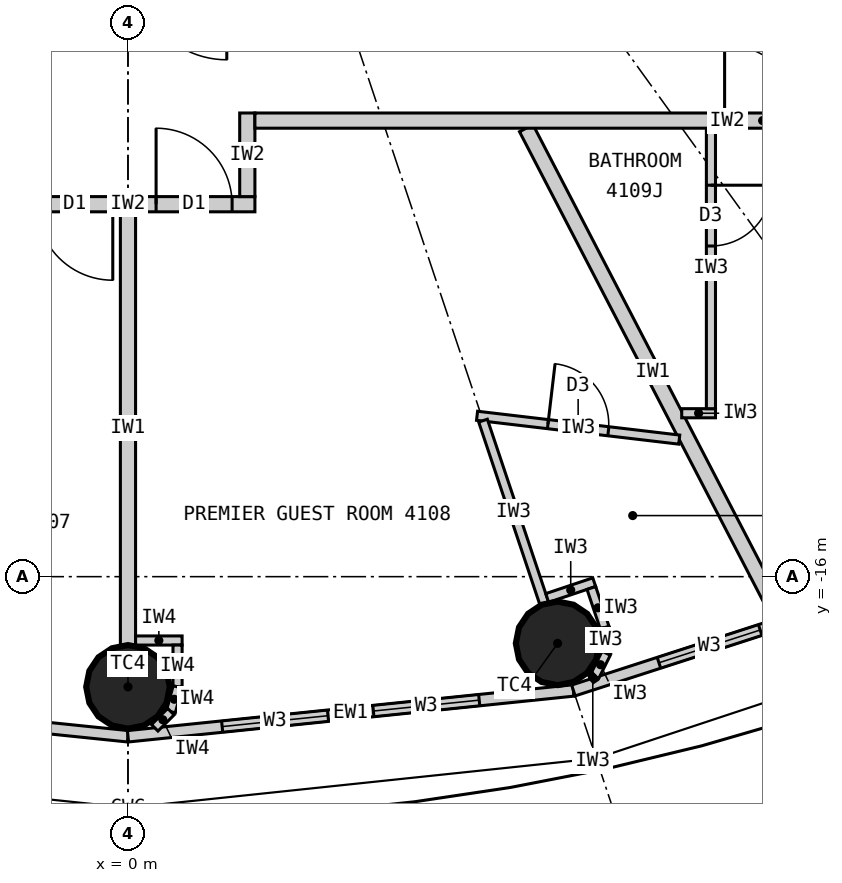
"""IFC4 building model, lengths in metres.
Left out: names, types, materials, properties, quantities, classifications, styles, units other than length and angle.
Written with IfcOpenShell. Run it as: python <this file> out.ifc"""

import sys

from ifc_helpers import new_model, si_unit, direction, frame, frame_2d, origin, origin_2d, place, context, subcontext, project, spatial, rectangle, circle, extrude, element, fill, save


model = new_model("IFC4")
c1 = context("Model", 3, precision=1e-05, world=origin(), true_north=direction((0.0, 1.0)))
c2 = subcontext(c1, "Body", "Model", "MODEL_VIEW")
j1 = project(units=[si_unit("LENGTHUNIT", "METRE"), si_unit("PLANEANGLEUNIT", "RADIAN")], contexts=[c1])
p1 = place(None, origin())
s1 = spatial("IfcSite", under=j1, at=p1, CompositionType="ELEMENT")
p2 = place(p1, origin())
s2 = spatial("IfcBuilding", under=s1, at=p2, CompositionType="ELEMENT")
p3 = place(p2, frame((0.0, 0.0, 156.6)))
s3 = spatial("IfcBuildingStorey", under=s2, at=p3, CompositionType="ELEMENT", Elevation=156.6)
for number, where, z_axis, x_axis in (
    (1, (0.0, -17.45, 0.0), (0.0, 0.0, 1.0), (1.0, 0.0, 0.0)),
    (2, (5.653, -16.877, 0.0), (0.0, 0.0, 1.0), (1.0, 0.0, 0.0)),
):
    element("IfcColumn", number, at=place(p3, frame(where, z_axis=z_axis, x_axis=x_axis)), inside=s3, PredefinedType="COLUMN", context=c2, shape_type="SweptSolid", body=[
        extrude(circle(Radius=0.55, at=origin_2d()), origin(), (0.0, 0.0, 1.0), 3.3),
    ])
p4 = place(p3, frame((-5.86, -17.497, 0.0), z_axis=(0.0, 0.0, 1.0), x_axis=(0.994751738032, -0.102318032045, 0.0)))
e3 = element("IfcWall", 3, at=p4, inside=s3, PredefinedType="ELEMENTEDWALL", context=c2, shape_type="SweptSolid", body=[
    extrude(rectangle(XDim=5.891, YDim=0.15, at=frame_2d((2.946, 0.0))), origin(), (0.0, 0.0, 1.0), 3.12),
])
p5 = place(p4, frame((1.246, 0.0, 0.9)))
e4 = element("IfcOpeningElement", 4, at=p5, cuts=e3, PredefinedType="OPENING", context=c2, shape_type="SweptSolid", body=[
    extrude(rectangle(XDim=1.4, YDim=1.9, at=frame_2d((0.7, 0.95))), frame((0.0, 0.085, 0.0), z_axis=(0.0, -1.0, 0.0), x_axis=(1.0, 0.0, 0.0)), (0.0, 0.0, 1.0), 0.17),
])
p6 = place(p4, frame((3.246, 0.0, 0.9)))
e5 = element("IfcOpeningElement", 5, at=p6, cuts=e3, PredefinedType="OPENING", context=c2, shape_type="SweptSolid", body=[
    extrude(rectangle(XDim=1.4, YDim=1.9, at=frame_2d((0.7, 0.95))), frame((0.0, 0.085, 0.0), z_axis=(0.0, -1.0, 0.0), x_axis=(1.0, 0.0, 0.0)), (0.0, 0.0, 1.0), 0.17),
])
p7 = place(p3, frame((0.0, -18.1, 0.0), z_axis=(0.0, 0.0, 1.0), x_axis=(0.994751738032, 0.102318032045, 0.0)))
e6 = element("IfcWall", 6, at=p7, inside=s3, PredefinedType="ELEMENTEDWALL", context=c2, shape_type="SweptSolid", body=[
    extrude(rectangle(XDim=5.891, YDim=0.15, at=frame_2d((2.946, 0.0))), origin(), (0.0, 0.0, 1.0), 3.12),
])
p8 = place(p7, frame((1.246, 0.0, 0.9)))
e7 = element("IfcOpeningElement", 7, at=p8, cuts=e6, PredefinedType="OPENING", context=c2, shape_type="SweptSolid", body=[
    extrude(rectangle(XDim=1.4, YDim=1.9, at=frame_2d((0.7, 0.95))), frame((0.0, 0.085, 0.0), z_axis=(0.0, -1.0, 0.0), x_axis=(1.0, 0.0, 0.0)), (0.0, 0.0, 1.0), 0.17),
])
p9 = place(p7, frame((3.246, 0.0, 0.9)))
e8 = element("IfcOpeningElement", 8, at=p9, cuts=e6, PredefinedType="OPENING", context=c2, shape_type="SweptSolid", body=[
    extrude(rectangle(XDim=1.4, YDim=1.9, at=frame_2d((0.7, 0.95))), frame((0.0, 0.085, 0.0), z_axis=(0.0, -1.0, 0.0), x_axis=(1.0, 0.0, 0.0)), (0.0, 0.0, 1.0), 0.17),
])
p10 = place(p3, frame((5.86, -17.497, 0.0), z_axis=(0.0, 0.0, 1.0), x_axis=(0.951432482129, 0.307857486429, 0.0)))
e9 = element("IfcWall", 9, at=p10, inside=s3, PredefinedType="ELEMENTEDWALL", context=c2, shape_type="SweptSolid", body=[
    extrude(rectangle(XDim=5.766, YDim=0.15, at=frame_2d((2.883, 0.0))), origin(), (0.0, 0.0, 1.0), 3.12),
])
p11 = place(p10, frame((1.183, 0.0, 0.9)))
e10 = element("IfcOpeningElement", 10, at=p11, cuts=e9, PredefinedType="OPENING", context=c2, shape_type="SweptSolid", body=[
    extrude(rectangle(XDim=1.4, YDim=1.9, at=frame_2d((0.7, 0.95))), frame((0.0, 0.085, 0.0), z_axis=(0.0, -1.0, 0.0), x_axis=(1.0, 0.0, 0.0)), (0.0, 0.0, 1.0), 0.17),
])
p12 = place(p10, frame((3.183, 0.0, 0.9)))
e11 = element("IfcOpeningElement", 11, at=p12, cuts=e9, PredefinedType="OPENING", context=c2, shape_type="SweptSolid", body=[
    extrude(rectangle(XDim=1.4, YDim=1.9, at=frame_2d((0.7, 0.95))), frame((0.0, 0.085, 0.0), z_axis=(0.0, -1.0, 0.0), x_axis=(1.0, 0.0, 0.0)), (0.0, 0.0, 1.0), 0.17),
])
p13 = place(p3, frame((0.0, -11.2, 0.0), z_axis=(0.0, 0.0, 1.0), x_axis=(0.0, -1.0, 0.0)))
e12 = element("IfcWall", 12, at=p13, inside=s3, PredefinedType="PARTITIONING", context=c2, shape_type="SweptSolid", body=[
    extrude(rectangle(XDim=5.7, YDim=0.2, at=frame_2d((2.85, 0.0))), origin(), (0.0, 0.0, 1.0), 2.42),
])
p14 = place(p3, frame((5.24, -10.1, 0.0), z_axis=(0.0, 0.0, 1.0), x_axis=(0.460532965373, -0.887642601391, 0.0)))
e13 = element("IfcWall", 13, at=p14, inside=s3, PredefinedType="PARTITIONING", context=c2, shape_type="SweptSolid", body=[
    extrude(rectangle(XDim=7.231, YDim=0.2, at=frame_2d((3.616, 0.0))), origin(), (0.0, 0.0, 1.0), 3.12),
])
p15 = place(p3, frame((1.67, -11.1, 0.0), z_axis=(0.0, 0.0, 1.0), x_axis=(-1.0, 0.0, 0.0)))
e14 = element("IfcWall", 14, at=p15, inside=s3, PredefinedType="PARTITIONING", context=c2, shape_type="SweptSolid", body=[
    extrude(rectangle(XDim=3.34, YDim=0.2, at=frame_2d((1.67, 0.0))), origin(), (0.0, 0.0, 1.0), 3.12),
])
p16 = place(p15, frame((1.87, 0.0, 0.0)))
e15 = element("IfcOpeningElement", 15, at=p16, cuts=e14, PredefinedType="OPENING", context=c2, shape_type="SweptSolid", body=[
    extrude(rectangle(XDim=1.0, YDim=2.2, at=frame_2d((0.5, 1.1))), frame((0.0, 0.11, 0.0), z_axis=(0.0, -1.0, 0.0), x_axis=(1.0, 0.0, 0.0)), (0.0, 0.0, 1.0), 0.22),
])
p17 = place(p15, frame((0.3, 0.0, 0.0)))
e16 = element("IfcOpeningElement", 16, at=p17, cuts=e14, PredefinedType="OPENING", context=c2, shape_type="SweptSolid", body=[
    extrude(rectangle(XDim=1.0, YDim=2.2, at=frame_2d((0.5, 1.1))), frame((0.0, 0.11, 0.0), z_axis=(0.0, -1.0, 0.0), x_axis=(1.0, 0.0, 0.0)), (0.0, 0.0, 1.0), 0.22),
])
p18 = place(p3, frame((1.57, -9.9, 0.0), z_axis=(0.0, 0.0, 1.0), x_axis=(0.0, -1.0, 0.0)))
e17 = element("IfcWall", 17, at=p18, inside=s3, PredefinedType="PARTITIONING", context=c2, shape_type="SweptSolid", body=[
    extrude(rectangle(XDim=1.1, YDim=0.2, at=frame_2d((0.55, 0.0))), origin(), (0.0, 0.0, 1.0), 3.12),
])
p19 = place(p3, frame((7.253, -14.197, 0.0), z_axis=(0.0, 0.0, 1.0), x_axis=(-0.993128188393, 0.117031625725, 0.0)))
e18 = element("IfcWall", 18, at=p19, inside=s3, PredefinedType="PARTITIONING", context=c2, shape_type="SweptSolid", body=[
    extrude(rectangle(XDim=2.678, YDim=0.12, at=frame_2d((1.339, 0.0))), origin(), (0.0, 0.0, 1.0), 3.12),
])
p20 = place(p19, frame((0.939, 0.0, 0.0)))
e19 = element("IfcOpeningElement", 19, at=p20, cuts=e18, PredefinedType="OPENING", context=c2, shape_type="SweptSolid", body=[
    extrude(rectangle(XDim=0.8, YDim=2.1, at=frame_2d((0.4, 1.05))), frame((0.0, 0.07, 0.0), z_axis=(0.0, -1.0, 0.0), x_axis=(1.0, 0.0, 0.0)), (0.0, 0.0, 1.0), 0.14),
])
p21 = place(p3, frame((4.671, -13.948, 0.0), z_axis=(0.0, 0.0, 1.0), x_axis=(0.317669167093, -0.948201613729, 0.0)))
e20 = element("IfcWall", 20, at=p21, inside=s3, PredefinedType="PARTITIONING", context=c2, shape_type="SweptSolid", body=[
    extrude(rectangle(XDim=2.54, YDim=0.12, at=frame_2d((1.27, 0.0))), origin(), (0.0, 0.0, 1.0), 2.42),
])
p22 = place(p3, frame((5.516, -16.28, 0.0), z_axis=(0.0, 0.0, 1.0), x_axis=(0.948157944392, 0.317799484717, 0.0)))
e21 = element("IfcWall", 21, at=p22, inside=s3, PredefinedType="PARTITIONING", context=c2, shape_type="SweptSolid", body=[
    extrude(rectangle(XDim=0.652, YDim=0.12, at=frame_2d((0.326, 0.0))), origin(), (0.0, 0.0, 1.0), 3.12),
])
p23 = place(p3, frame((6.097, -16.149, 0.0), z_axis=(0.0, 0.0, 1.0), x_axis=(0.317292604854, -0.948327687514, 0.0)))
e22 = element("IfcWall", 22, at=p23, inside=s3, PredefinedType="PARTITIONING", context=c2, shape_type="SweptSolid", body=[
    extrude(rectangle(XDim=0.55, YDim=0.12, at=frame_2d((0.275, 0.0))), origin(), (0.0, 0.0, 1.0), 3.12),
])
for number, where, z_axis, x_axis in (
    (23, (6.271, -16.67, 0.0), (0.0, 0.0, 1.0), (0.061, -0.998, 0.0)),
    (24, (6.292, -17.007, 0.0), (0.0, 0.0, 1.0), (-0.445, -0.895, 0.0)),
):
    element("IfcWall", number, at=place(p3, frame(where, z_axis=z_axis, x_axis=x_axis)), inside=s3, PredefinedType="PARTITIONING", context=c2, shape_type="SweptSolid", body=[
        extrude(rectangle(XDim=0.338, YDim=0.12, at=frame_2d((0.169, 0.0))), origin(), (0.0, 0.0, 1.0), 3.12),
    ])
p24 = place(p3, frame((6.142, -17.31, 0.0), z_axis=(0.0, 0.0, 1.0), x_axis=(-0.835039693181, -0.550189704386, 0.0)))
e25 = element("IfcWall", 25, at=p24, inside=s3, PredefinedType="PARTITIONING", context=c2, shape_type="SweptSolid", body=[
    extrude(rectangle(XDim=0.062, YDim=0.12, at=frame_2d((0.031, 0.0))), origin(), (0.0, 0.0, 1.0), 3.12),
])
p25 = place(p3, frame((7.286, -13.85, 0.0), z_axis=(0.0, 0.0, 1.0), x_axis=(1.0, 0.0, 0.0)))
e26 = element("IfcWall", 26, at=p25, inside=s3, PredefinedType="PARTITIONING", context=c2, shape_type="SweptSolid", body=[
    extrude(rectangle(XDim=0.444, YDim=0.12, at=frame_2d((0.222, 0.0))), origin(), (0.0, 0.0, 1.0), 3.12),
])
p26 = place(p3, frame((7.67, -10.1, 0.0), z_axis=(0.0, 0.0, 1.0), x_axis=(0.0, -1.0, 0.0)))
e27 = element("IfcWall", 27, at=p26, inside=s3, PredefinedType="PARTITIONING", context=c2, shape_type="SweptSolid", body=[
    extrude(rectangle(XDim=3.69, YDim=0.12, at=frame_2d((1.845, 0.0))), origin(), (0.0, 0.0, 1.0), 3.12),
])
p27 = place(p26, frame((0.75, 0.0, 0.0)))
e28 = element("IfcOpeningElement", 28, at=p27, cuts=e27, PredefinedType="OPENING", context=c2, shape_type="SweptSolid", body=[
    extrude(rectangle(XDim=0.8, YDim=2.1, at=frame_2d((0.4, 1.05))), frame((0.0, 0.07, 0.0), z_axis=(0.0, -1.0, 0.0), x_axis=(1.0, 0.0, 0.0)), (0.0, 0.0, 1.0), 0.14),
])
p28 = place(p3, frame((14.1, -10.0, 0.0), z_axis=(0.0, 0.0, 1.0), x_axis=(-1.0, 0.0, 0.0)))
e29 = element("IfcWall", 29, at=p28, inside=s3, PredefinedType="PARTITIONING", context=c2, shape_type="SweptSolid", body=[
    extrude(rectangle(XDim=12.43, YDim=0.2, at=frame_2d((6.215, 0.0))), origin(), (0.0, 0.0, 1.0), 3.12),
])
p29 = place(p28, frame((5.25, 0.0, 0.0)))
e30 = element("IfcOpeningElement", 30, at=p29, cuts=e29, PredefinedType="OPENING", context=c2, shape_type="SweptSolid", body=[
    extrude(rectangle(XDim=1.0, YDim=2.2, at=frame_2d((0.5, 1.1))), frame((0.0, 0.11, 0.0), z_axis=(0.0, -1.0, 0.0), x_axis=(1.0, 0.0, 0.0)), (0.0, 0.0, 1.0), 0.22),
])
p30 = place(p3, frame((0.1, -16.84, 0.0), z_axis=(0.0, 0.0, 1.0), x_axis=(1.0, 0.0, 0.0)))
e31 = element("IfcWall", 31, at=p30, inside=s3, PredefinedType="PARTITIONING", context=c2, shape_type="SweptSolid", body=[
    extrude(rectangle(XDim=0.612, YDim=0.12, at=frame_2d((0.306, 0.0))), origin(), (0.0, 0.0, 1.0), 3.12),
])
p31 = place(p3, frame((0.652, -16.9, 0.0), z_axis=(0.0, 0.0, 1.0), x_axis=(0.0, -1.0, 0.0)))
e32 = element("IfcWall", 32, at=p31, inside=s3, PredefinedType="PARTITIONING", context=c2, shape_type="SweptSolid", body=[
    extrude(rectangle(XDim=0.55, YDim=0.12, at=frame_2d((0.275, 0.0))), origin(), (0.0, 0.0, 1.0), 3.12),
])
p32 = place(p3, frame((0.652, -17.45, 0.0), z_axis=(0.0, 0.0, 1.0), x_axis=(-0.258832454679, -0.965922233104, 0.0)))
e33 = element("IfcWall", 33, at=p32, inside=s3, PredefinedType="PARTITIONING", context=c2, shape_type="SweptSolid", body=[
    extrude(rectangle(XDim=0.338, YDim=0.12, at=frame_2d((0.169, 0.0))), origin(), (0.0, 0.0, 1.0), 3.12),
])
p33 = place(p3, frame((0.565, -17.776, 0.0), z_axis=(0.0, 0.0, 1.0), x_axis=(-0.707106781187, -0.707106781187, 0.0)))
e34 = element("IfcWall", 34, at=p33, inside=s3, PredefinedType="PARTITIONING", context=c2, shape_type="SweptSolid", body=[
    extrude(rectangle(XDim=0.301, YDim=0.12, at=frame_2d((0.15, 0.0))), origin(), (0.0, 0.0, 1.0), 3.12),
])
p34 = place(p8, origin())
e35 = element("IfcWindow", 35, at=p34, inside=s3, PartitioningType="SINGLE_PANEL", PredefinedType="WINDOW", context=c2, shape_type="SweptSolid", body=[
    extrude(rectangle(XDim=1.4, YDim=1.9, at=frame_2d((0.7, 0.95))), frame((0.0, 0.03, 0.0), z_axis=(0.0, -1.0, 0.0), x_axis=(1.0, 0.0, 0.0)), (0.0, 0.0, 1.0), 0.06),
])
fill(e7, e35)
p35 = place(p9, origin())
e36 = element("IfcWindow", 36, at=p35, inside=s3, PartitioningType="SINGLE_PANEL", PredefinedType="WINDOW", context=c2, shape_type="SweptSolid", body=[
    extrude(rectangle(XDim=1.4, YDim=1.9, at=frame_2d((0.7, 0.95))), frame((0.0, 0.03, 0.0), z_axis=(0.0, -1.0, 0.0), x_axis=(1.0, 0.0, 0.0)), (0.0, 0.0, 1.0), 0.06),
])
fill(e8, e36)
p36 = place(p11, origin())
e37 = element("IfcWindow", 37, at=p36, inside=s3, PartitioningType="SINGLE_PANEL", PredefinedType="WINDOW", context=c2, shape_type="SweptSolid", body=[
    extrude(rectangle(XDim=1.4, YDim=1.9, at=frame_2d((0.7, 0.95))), frame((0.0, 0.03, 0.0), z_axis=(0.0, -1.0, 0.0), x_axis=(1.0, 0.0, 0.0)), (0.0, 0.0, 1.0), 0.06),
])
fill(e10, e37)
p37 = place(p16, origin())
e38 = element("IfcDoor", 38, at=p37, inside=s3, OperationType="SINGLE_SWING_LEFT", PredefinedType="DOOR", context=c2, shape_type="SweptSolid", body=[
    extrude(rectangle(XDim=1.0, YDim=2.2, at=frame_2d((0.5, 1.1))), frame((0.0, 0.025, 0.0), z_axis=(0.0, -1.0, 0.0), x_axis=(1.0, 0.0, 0.0)), (0.0, 0.0, 1.0), 0.05),
])
fill(e15, e38)
p38 = place(p20, origin())
e39 = element("IfcDoor", 39, at=p38, inside=s3, OperationType="SINGLE_SWING_RIGHT", PredefinedType="DOOR", context=c2, shape_type="SweptSolid", body=[
    extrude(rectangle(XDim=0.8, YDim=2.1, at=frame_2d((0.4, 1.05))), frame((0.0, 0.025, 0.0), z_axis=(0.0, -1.0, 0.0), x_axis=(1.0, 0.0, 0.0)), (0.0, 0.0, 1.0), 0.05),
])
fill(e19, e39)
p39 = place(p17, origin())
e40 = element("IfcDoor", 40, at=p39, inside=s3, OperationType="SINGLE_SWING_RIGHT", PredefinedType="DOOR", context=c2, shape_type="SweptSolid", body=[
    extrude(rectangle(XDim=1.0, YDim=2.2, at=frame_2d((0.5, 1.1))), frame((0.0, 0.025, 0.0), z_axis=(0.0, -1.0, 0.0), x_axis=(1.0, 0.0, 0.0)), (0.0, 0.0, 1.0), 0.05),
])
fill(e16, e40)
p40 = place(p27, origin())
e41 = element("IfcDoor", 41, at=p40, inside=s3, OperationType="SINGLE_SWING_LEFT", PredefinedType="DOOR", context=c2, shape_type="SweptSolid", body=[
    extrude(rectangle(XDim=0.8, YDim=2.1, at=frame_2d((0.4, 1.05))), frame((0.0, 0.025, 0.0), z_axis=(0.0, -1.0, 0.0), x_axis=(1.0, 0.0, 0.0)), (0.0, 0.0, 1.0), 0.05),
])
fill(e28, e41)
p41 = place(p29, origin())
e42 = element("IfcDoor", 42, at=p41, inside=s3, OperationType="SINGLE_SWING_RIGHT", PredefinedType="DOOR", context=c2, shape_type="SweptSolid", body=[
    extrude(rectangle(XDim=1.0, YDim=2.2, at=frame_2d((0.5, 1.1))), frame((0.0, 0.025, 0.0), z_axis=(0.0, -1.0, 0.0), x_axis=(1.0, 0.0, 0.0)), (0.0, 0.0, 1.0), 0.05),
])
fill(e30, e42)
save(model, sys.argv[1])
